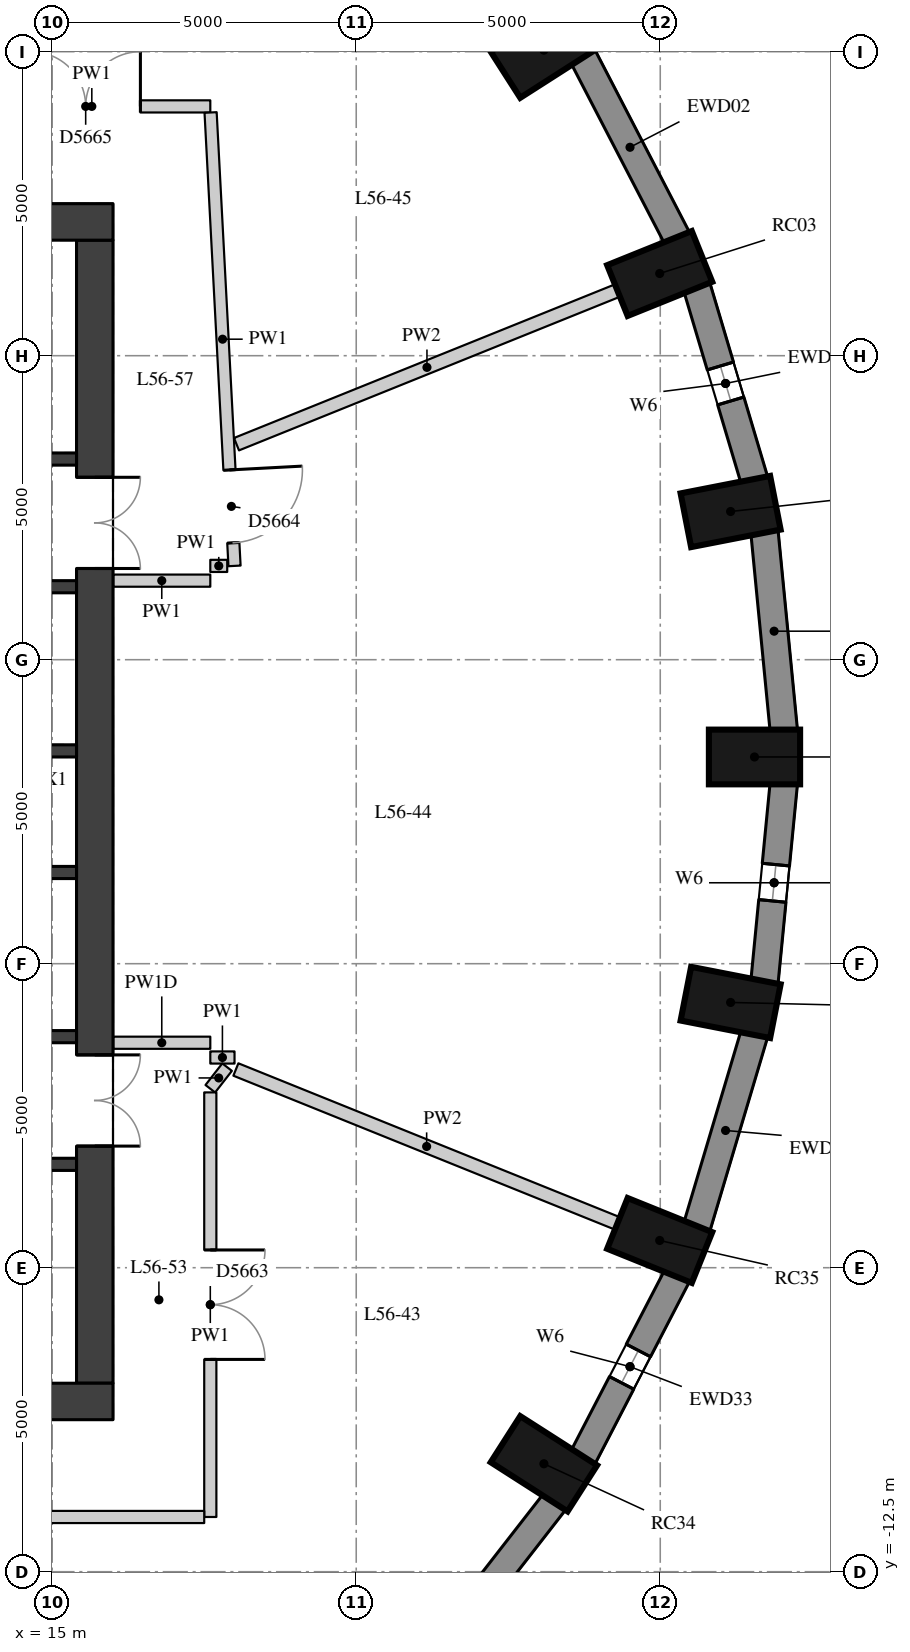
"""IFC4 building model, lengths in metres.
Left out: names, types, materials, properties, quantities, classifications, styles, units other than length and angle.
Written with IfcOpenShell. Run it as: python <this file> out.ifc"""

import sys

from ifc_helpers import new_model, si_unit, direction, frame, frame_2d, origin, origin_2d, place, context, subcontext, project, spatial, rectangle, extrude, element, fill, save


model = new_model("IFC4")
c1 = context("Model", 3, precision=1e-05, world=origin(), true_north=direction((0.0, 1.0)))
c2 = subcontext(c1, "Body", "Model", "MODEL_VIEW")
j1 = project(units=[si_unit("LENGTHUNIT", "METRE"), si_unit("PLANEANGLEUNIT", "RADIAN")], contexts=[c1])
p1 = place(None, origin())
s1 = spatial("IfcSite", under=j1, at=p1, CompositionType="ELEMENT")
p2 = place(p1, origin())
s2 = spatial("IfcBuilding", under=s1, at=p2, CompositionType="ELEMENT")
p3 = place(p2, frame((0.0, 0.0, 199.1)))
s3 = spatial("IfcBuildingStorey", under=s2, at=p3, CompositionType="ELEMENT", Elevation=199.1)
for number, where, z_axis, x_axis in (
    (1, (26.55, 0.9, 0.0), (0.0, 0.0, 1.0), (1.0, 0.0, 0.0)),
    (2, (26.157, 4.937, 0.0), (0.0, 0.0, 1.0), (0.981, 0.192, 0.0)),
    (3, (24.991, 8.852, 0.0), (0.0, 0.0, 1.0), (0.927, 0.374, 0.0)),
    (4, (23.087, 12.525, 0.0), (0.0, 0.0, 1.0), (0.842, 0.539, 0.0)),
    (5, (23.087, -10.725, 0.0), (0.0, 0.0, 1.0), (0.842, -0.539, 0.0)),
    (6, (24.991, -7.052, 0.0), (0.0, 0.0, 1.0), (0.927, -0.374, 0.0)),
    (7, (26.157, -3.137, 0.0), (0.0, 0.0, 1.0), (0.981, -0.192, 0.0)),
):
    element("IfcColumn", number, at=place(p3, frame(where, z_axis=z_axis, x_axis=x_axis)), inside=s3, PredefinedType="COLUMN", context=c2, shape_type="SweptSolid", body=[
        extrude(rectangle(XDim=1.5, YDim=0.9, at=origin_2d()), origin(), (0.0, 0.0, 1.0), 3.3),
    ])
p4 = place(p3, frame((27.032, 1.33, 0.0), z_axis=(0.0, 0.0, 1.0), x_axis=(-0.096824116835, 0.995301507283, 0.0)))
e8 = element("IfcWall", 8, at=p4, inside=s3, PredefinedType="SOLIDWALL", context=c2, shape_type="SweptSolid", body=[
    extrude(rectangle(XDim=3.293, YDim=0.45, at=frame_2d((1.646, 0.0))), origin(), (0.0, 0.0, 1.0), 3.02),
])
p5 = place(p3, frame((26.548, 5.452, 0.0), z_axis=(0.0, 0.0, 1.0), x_axis=(-0.285444972963, 0.958395099847, 0.0)))
e9 = element("IfcWall", 9, at=p5, inside=s3, PredefinedType="SOLIDWALL", context=c2, shape_type="SweptSolid", body=[
    extrude(rectangle(XDim=3.32, YDim=0.45, at=frame_2d((1.66, 0.0))), origin(), (0.0, 0.0, 1.0), 3.02),
])
p6 = place(p5, frame((1.36, 0.0, 0.4)))
e10 = element("IfcOpeningElement", 10, at=p6, cuts=e9, PredefinedType="OPENING", context=c2, shape_type="SweptSolid", body=[
    extrude(rectangle(XDim=0.6, YDim=1.75, at=frame_2d((0.3, 0.875))), frame((0.0, 0.235, 0.0), z_axis=(0.0, -1.0, 0.0), x_axis=(1.0, 0.0, 0.0)), (0.0, 0.0, 1.0), 0.47),
])
p7 = place(p3, frame((25.278, 9.432, 0.0), z_axis=(0.0, 0.0, 1.0), x_axis=(-0.460175500475, 0.887827972505, 0.0)))
e11 = element("IfcWall", 11, at=p7, inside=s3, PredefinedType="SOLIDWALL", context=c2, shape_type="SweptSolid", body=[
    extrude(rectangle(XDim=3.371, YDim=0.45, at=frame_2d((1.685, 0.0))), origin(), (0.0, 0.0, 1.0), 3.02),
])
p8 = place(p3, frame((21.151, -14.061, 0.0), z_axis=(0.0, 0.0, 1.0), x_axis=(0.614255239631, 0.789107407509, 0.0)))
e12 = element("IfcWall", 12, at=p8, inside=s3, PredefinedType="SOLIDWALL", context=c2, shape_type="SweptSolid", body=[
    extrude(rectangle(XDim=3.438, YDim=0.45, at=frame_2d((1.719, 0.0))), origin(), (0.0, 0.0, 1.0), 3.02),
])
p9 = place(p3, frame((23.727, -10.624, 0.0), z_axis=(0.0, 0.0, 1.0), x_axis=(0.460175500475, 0.887827972505, 0.0)))
e13 = element("IfcWall", 13, at=p9, inside=s3, PredefinedType="SOLIDWALL", context=c2, shape_type="SweptSolid", body=[
    extrude(rectangle(XDim=3.371, YDim=0.45, at=frame_2d((1.685, 0.0))), origin(), (0.0, 0.0, 1.0), 3.02),
])
p10 = place(p9, frame((1.385, 0.0, 0.4)))
e14 = element("IfcOpeningElement", 14, at=p10, cuts=e13, PredefinedType="OPENING", context=c2, shape_type="SweptSolid", body=[
    extrude(rectangle(XDim=0.6, YDim=1.75, at=frame_2d((0.3, 0.875))), frame((0.0, 0.235, 0.0), z_axis=(0.0, -1.0, 0.0), x_axis=(1.0, 0.0, 0.0)), (0.0, 0.0, 1.0), 0.47),
])
p11 = place(p3, frame((25.6, -6.834, 0.0), z_axis=(0.0, 0.0, 1.0), x_axis=(0.285444972963, 0.958395099847, 0.0)))
e15 = element("IfcWall", 15, at=p11, inside=s3, PredefinedType="SOLIDWALL", context=c2, shape_type="SweptSolid", body=[
    extrude(rectangle(XDim=3.32, YDim=0.45, at=frame_2d((1.66, 0.0))), origin(), (0.0, 0.0, 1.0), 3.02),
])
p12 = place(p3, frame((26.713, -2.808, 0.0), z_axis=(0.0, 0.0, 1.0), x_axis=(0.096816972749, 0.995302202242, 0.0)))
e16 = element("IfcWall", 16, at=p12, inside=s3, PredefinedType="SOLIDWALL", context=c2, shape_type="SweptSolid", body=[
    extrude(rectangle(XDim=3.293, YDim=0.45, at=frame_2d((1.646, 0.0))), origin(), (0.0, 0.0, 1.0), 3.02),
])
p13 = place(p12, frame((1.347, 0.0, 0.4)))
e17 = element("IfcOpeningElement", 17, at=p13, cuts=e16, PredefinedType="OPENING", context=c2, shape_type="SweptSolid", body=[
    extrude(rectangle(XDim=0.6, YDim=1.75, at=frame_2d((0.3, 0.875))), frame((0.0, 0.235, 0.0), z_axis=(0.0, -1.0, 0.0), x_axis=(1.0, 0.0, 0.0)), (0.0, 0.0, 1.0), 0.47),
])
p14 = place(p3, frame((15.7, -9.4, 0.0), z_axis=(0.0, 0.0, 1.0), x_axis=(0.0, 1.0, 0.0)))
e18 = element("IfcWall", 18, at=p14, inside=s3, PredefinedType="SHEAR", context=c2, shape_type="SweptSolid", body=[
    extrude(rectangle(XDim=18.8, YDim=0.6, at=frame_2d((9.4, 0.0))), origin(), (0.0, 0.0, 1.0), 3.02),
])
p15 = place(p14, frame((13.4, 0.0, 0.0)))
e19 = element("IfcOpeningElement", 19, at=p15, cuts=e18, PredefinedType="OPENING", context=c2, shape_type="SweptSolid", body=[
    extrude(rectangle(XDim=1.5, YDim=2.1, at=frame_2d((0.75, 1.05))), frame((0.0, 0.31, 0.0), z_axis=(0.0, -1.0, 0.0), x_axis=(1.0, 0.0, 0.0)), (0.0, 0.0, 1.0), 0.62),
])
p16 = place(p14, frame((3.9, 0.0, 0.0)))
e20 = element("IfcOpeningElement", 20, at=p16, cuts=e18, PredefinedType="OPENING", context=c2, shape_type="SweptSolid", body=[
    extrude(rectangle(XDim=1.5, YDim=2.1, at=frame_2d((0.75, 1.05))), frame((0.0, 0.31, 0.0), z_axis=(0.0, -1.0, 0.0), x_axis=(1.0, 0.0, 0.0)), (0.0, 0.0, 1.0), 0.62),
])
for number, where, z_axis, x_axis in (
    (21, (4.0, 9.7, 0.0), (0.0, 0.0, 1.0), (1.0, 0.0, 0.0)),
    (22, (4.0, -9.7, 0.0), (0.0, 0.0, 1.0), (1.0, 0.0, 0.0)),
):
    element("IfcWall", number, at=place(p3, frame(where, z_axis=z_axis, x_axis=x_axis)), inside=s3, PredefinedType="SHEAR", context=c2, shape_type="SweptSolid", body=[
        extrude(rectangle(XDim=12.0, YDim=0.6, at=frame_2d((6.0, 0.0))), origin(), (0.0, 0.0, 1.0), 3.02),
    ])
p17 = place(p3, frame((4.6, 5.8, 0.0), z_axis=(0.0, 0.0, 1.0), x_axis=(1.0, 0.0, 0.0)))
e23 = element("IfcWall", 23, at=p17, inside=s3, PredefinedType="SHEAR", context=c2, shape_type="SweptSolid", body=[
    extrude(rectangle(XDim=10.8, YDim=0.2, at=frame_2d((5.4, 0.0))), origin(), (0.0, 0.0, 1.0), 3.02),
])
p18 = place(p17, frame((7.05, 0.0, 0.0)))
e24 = element("IfcOpeningElement", 24, at=p18, cuts=e23, PredefinedType="OPENING", context=c2, shape_type="SweptSolid", body=[
    extrude(rectangle(XDim=1.1, YDim=2.1, at=frame_2d((0.55, 1.05))), frame((0.0, 0.11, 0.0), z_axis=(0.0, -1.0, 0.0), x_axis=(1.0, 0.0, 0.0)), (0.0, 0.0, 1.0), 0.22),
])
p19 = place(p17, frame((9.05, 0.0, 0.0)))
e25 = element("IfcOpeningElement", 25, at=p19, cuts=e23, PredefinedType="OPENING", context=c2, shape_type="SweptSolid", body=[
    extrude(rectangle(XDim=1.1, YDim=2.1, at=frame_2d((0.55, 1.05))), frame((0.0, 0.11, 0.0), z_axis=(0.0, -1.0, 0.0), x_axis=(1.0, 0.0, 0.0)), (0.0, 0.0, 1.0), 0.22),
])
p20 = place(p3, frame((4.6, 3.7, 0.0), z_axis=(0.0, 0.0, 1.0), x_axis=(1.0, 0.0, 0.0)))
e26 = element("IfcWall", 26, at=p20, inside=s3, PredefinedType="SHEAR", context=c2, shape_type="SweptSolid", body=[
    extrude(rectangle(XDim=10.8, YDim=0.2, at=frame_2d((5.4, 0.0))), origin(), (0.0, 0.0, 1.0), 3.02),
])
p21 = place(p20, frame((6.6, 0.0, 0.0)))
e27 = element("IfcOpeningElement", 27, at=p21, cuts=e26, PredefinedType="OPENING", context=c2, shape_type="SweptSolid", body=[
    extrude(rectangle(XDim=1.1, YDim=2.1, at=frame_2d((0.55, 1.05))), frame((0.0, 0.11, 0.0), z_axis=(0.0, -1.0, 0.0), x_axis=(1.0, 0.0, 0.0)), (0.0, 0.0, 1.0), 0.22),
])
p22 = place(p20, frame((8.9, 0.0, 0.0)))
e28 = element("IfcOpeningElement", 28, at=p22, cuts=e26, PredefinedType="OPENING", context=c2, shape_type="SweptSolid", body=[
    extrude(rectangle(XDim=1.1, YDim=2.1, at=frame_2d((0.55, 1.05))), frame((0.0, 0.11, 0.0), z_axis=(0.0, -1.0, 0.0), x_axis=(1.0, 0.0, 0.0)), (0.0, 0.0, 1.0), 0.22),
])
for number, where, z_axis, x_axis in (
    (29, (4.6, 1.0, 0.0), (0.0, 0.0, 1.0), (1.0, 0.0, 0.0)),
    (30, (4.6, -1.0, 0.0), (0.0, 0.0, 1.0), (1.0, 0.0, 0.0)),
):
    element("IfcWall", number, at=place(p3, frame(where, z_axis=z_axis, x_axis=x_axis)), inside=s3, PredefinedType="SHEAR", context=c2, shape_type="SweptSolid", body=[
        extrude(rectangle(XDim=10.8, YDim=0.2, at=frame_2d((5.4, 0.0))), origin(), (0.0, 0.0, 1.0), 3.02),
    ])
p23 = place(p3, frame((4.6, -3.7, 0.0), z_axis=(0.0, 0.0, 1.0), x_axis=(1.0, 0.0, 0.0)))
e31 = element("IfcWall", 31, at=p23, inside=s3, PredefinedType="SHEAR", context=c2, shape_type="SweptSolid", body=[
    extrude(rectangle(XDim=10.8, YDim=0.2, at=frame_2d((5.4, 0.0))), origin(), (0.0, 0.0, 1.0), 3.02),
])
p24 = place(p23, frame((6.6, 0.0, 0.0)))
e32 = element("IfcOpeningElement", 32, at=p24, cuts=e31, PredefinedType="OPENING", context=c2, shape_type="SweptSolid", body=[
    extrude(rectangle(XDim=1.1, YDim=2.1, at=frame_2d((0.55, 1.05))), frame((0.0, 0.11, 0.0), z_axis=(0.0, -1.0, 0.0), x_axis=(1.0, 0.0, 0.0)), (0.0, 0.0, 1.0), 0.22),
])
p25 = place(p23, frame((8.9, 0.0, 0.0)))
e33 = element("IfcOpeningElement", 33, at=p25, cuts=e31, PredefinedType="OPENING", context=c2, shape_type="SweptSolid", body=[
    extrude(rectangle(XDim=1.1, YDim=2.1, at=frame_2d((0.55, 1.05))), frame((0.0, 0.11, 0.0), z_axis=(0.0, -1.0, 0.0), x_axis=(1.0, 0.0, 0.0)), (0.0, 0.0, 1.0), 0.22),
])
p26 = place(p3, frame((4.6, -5.8, 0.0), z_axis=(0.0, 0.0, 1.0), x_axis=(1.0, 0.0, 0.0)))
e34 = element("IfcWall", 34, at=p26, inside=s3, PredefinedType="SHEAR", context=c2, shape_type="SweptSolid", body=[
    extrude(rectangle(XDim=10.8, YDim=0.2, at=frame_2d((5.4, 0.0))), origin(), (0.0, 0.0, 1.0), 3.02),
])
p27 = place(p3, frame((17.6, -4.043, 0.0), z_axis=(0.0, 0.0, 1.0), x_axis=(1.0, 0.0, 0.0)))
e35 = element("IfcWall", 35, at=p27, inside=s3, PredefinedType="PARTITIONING", context=c2, shape_type="SweptSolid", body=[
    extrude(rectangle(XDim=0.398, YDim=0.2, at=frame_2d((0.199, 0.0))), origin(), (0.0, 0.0, 1.0), 3.02),
])
p28 = place(p3, frame((17.876, -4.201, 0.0), z_axis=(0.0, 0.0, 1.0), x_axis=(-0.61405326993, -0.789264582816, 0.0)))
e36 = element("IfcWall", 36, at=p28, inside=s3, PredefinedType="PARTITIONING", context=c2, shape_type="SweptSolid", body=[
    extrude(rectangle(XDim=0.45, YDim=0.2, at=frame_2d((0.225, 0.0))), origin(), (0.0, 0.0, 1.0), 3.02),
])
p29 = place(p3, frame((17.6, -4.617, 0.0), z_axis=(0.0, 0.0, 1.0), x_axis=(0.0, -1.0, 0.0)))
e37 = element("IfcWall", 37, at=p29, inside=s3, PredefinedType="PARTITIONING", context=c2, shape_type="SweptSolid", body=[
    extrude(rectangle(XDim=6.983, YDim=0.2, at=frame_2d((3.492, 0.0))), origin(), (0.0, 0.0, 1.0), 3.02),
])
p30 = place(p29, frame((2.592, 0.0, 0.0)))
e38 = element("IfcOpeningElement", 38, at=p30, cuts=e37, PredefinedType="OPENING", context=c2, shape_type="SweptSolid", body=[
    extrude(rectangle(XDim=1.8, YDim=2.1, at=frame_2d((0.9, 1.05))), frame((0.0, 0.11, 0.0), z_axis=(0.0, -1.0, 0.0), x_axis=(1.0, 0.0, 0.0)), (0.0, 0.0, 1.0), 0.22),
])
p31 = place(p3, frame((17.5, -11.6, 0.0), z_axis=(0.0, 0.0, 1.0), x_axis=(-1.0, 0.0, 0.0)))
e39 = element("IfcWall", 39, at=p31, inside=s3, PredefinedType="PARTITIONING", context=c2, shape_type="SweptSolid", body=[
    extrude(rectangle(XDim=7.847, YDim=0.2, at=frame_2d((3.923, 0.0))), origin(), (0.0, 0.0, 1.0), 3.02),
])
p32 = place(p3, frame((13.703, 11.6, 0.0), z_axis=(0.0, 0.0, 1.0), x_axis=(1.0, 0.0, 0.0)))
e40 = element("IfcWall", 40, at=p32, inside=s3, PredefinedType="PARTITIONING", context=c2, shape_type="SweptSolid", body=[
    extrude(rectangle(XDim=3.897, YDim=0.2, at=frame_2d((1.949, 0.0))), origin(), (0.0, 0.0, 1.0), 3.02),
])
p33 = place(p32, frame((0.948, 0.0, 0.0)))
e41 = element("IfcOpeningElement", 41, at=p33, cuts=e40, PredefinedType="OPENING", context=c2, shape_type="SweptSolid", body=[
    extrude(rectangle(XDim=1.8, YDim=2.1, at=frame_2d((0.9, 1.05))), frame((0.0, 0.11, 0.0), z_axis=(0.0, -1.0, 0.0), x_axis=(1.0, 0.0, 0.0)), (0.0, 0.0, 1.0), 0.22),
])
p34 = place(p3, frame((17.605, 11.5, 0.0), z_axis=(0.0, 0.0, 1.0), x_axis=(0.052701255232, -0.998610323248, 0.0)))
e42 = element("IfcWall", 42, at=p34, inside=s3, PredefinedType="PARTITIONING", context=c2, shape_type="SweptSolid", body=[
    extrude(rectangle(XDim=7.468, YDim=0.2, at=frame_2d((3.734, 0.0))), origin(), (0.0, 0.0, 1.0), 3.02),
])
p35 = place(p34, frame((5.887, 0.0, 0.0)))
e43 = element("IfcOpeningElement", 43, at=p35, cuts=e42, PredefinedType="OPENING", context=c2, shape_type="SweptSolid", body=[
    extrude(rectangle(XDim=1.2, YDim=2.1, at=frame_2d((0.6, 1.05))), frame((0.0, 0.11, 0.0), z_axis=(0.0, -1.0, 0.0), x_axis=(1.0, 0.0, 0.0)), (0.0, 0.0, 1.0), 0.22),
])
p36 = place(p3, frame((17.878, 4.043, 0.0), z_axis=(0.0, 0.0, 1.0), x_axis=(-1.0, 0.0, 0.0)))
e44 = element("IfcWall", 44, at=p36, inside=s3, PredefinedType="PARTITIONING", context=c2, shape_type="SweptSolid", body=[
    extrude(rectangle(XDim=0.278, YDim=0.2, at=frame_2d((0.139, 0.0))), origin(), (0.0, 0.0, 1.0), 3.02),
])
p37 = place(p3, frame((17.6, 3.8, 0.0), z_axis=(0.0, 0.0, 1.0), x_axis=(-1.0, 0.0, 0.0)))
e45 = element("IfcWall", 45, at=p37, inside=s3, PredefinedType="PARTITIONING", context=c2, shape_type="SweptSolid", body=[
    extrude(rectangle(XDim=1.596, YDim=0.2, at=frame_2d((0.798, 0.0))), origin(), (0.0, 0.0, 1.0), 3.02),
])
p38 = place(p3, frame((16.004, -3.8, 0.0), z_axis=(0.0, 0.0, 1.0), x_axis=(1.0, 0.0, 0.0)))
e46 = element("IfcWall", 46, at=p38, inside=s3, PredefinedType="PARTITIONING", context=c2, shape_type="SweptSolid", body=[
    extrude(rectangle(XDim=1.596, YDim=0.2, at=frame_2d((0.798, 0.0))), origin(), (0.0, 0.0, 1.0), 2.47),
])
p39 = place(p3, frame((24.295, 8.571, 0.0), z_axis=(0.0, 0.0, 1.0), x_axis=(-0.927395972896, -0.374081153571, 0.0)))
e47 = element("IfcWall", 47, at=p39, inside=s3, PredefinedType="PARTITIONING", context=c2, shape_type="SweptSolid", body=[
    extrude(rectangle(XDim=6.755, YDim=0.22, at=frame_2d((3.377, 0.0))), origin(), (0.0, 0.0, 1.0), 3.02),
])
p40 = place(p3, frame((16.863, -16.312, 0.0), z_axis=(0.0, 0.0, 1.0), x_axis=(-0.603636051313, 0.797260006243, 0.0)))
e48 = element("IfcWall", 48, at=p40, inside=s3, PredefinedType="PARTITIONING", context=c2, shape_type="SweptSolid", body=[
    extrude(rectangle(XDim=5.706, YDim=0.22, at=frame_2d((2.853, 0.0))), origin(), (0.0, 0.0, 1.0), 3.02),
])
p41 = place(p3, frame((24.295, -6.771, 0.0), z_axis=(0.0, 0.0, 1.0), x_axis=(-0.927382720906, 0.374114005305, 0.0)))
e49 = element("IfcWall", 49, at=p41, inside=s3, PredefinedType="PARTITIONING", context=c2, shape_type="SweptSolid", body=[
    extrude(rectangle(XDim=6.766, YDim=0.22, at=frame_2d((3.383, 0.0))), origin(), (0.0, 0.0, 1.0), 3.02),
])
p42 = place(p6, origin())
e50 = element("IfcWindow", 50, at=p42, inside=s3, PartitioningType="SINGLE_PANEL", PredefinedType="WINDOW", context=c2, shape_type="SweptSolid", body=[
    extrude(rectangle(XDim=0.6, YDim=1.75, at=frame_2d((0.3, 0.875))), frame((0.0, 0.035, 0.0), z_axis=(0.0, -1.0, 0.0), x_axis=(1.0, 0.0, 0.0)), (0.0, 0.0, 1.0), 0.06),
])
fill(e10, e50)
p43 = place(p10, origin())
e51 = element("IfcWindow", 51, at=p43, inside=s3, PartitioningType="SINGLE_PANEL", PredefinedType="WINDOW", context=c2, shape_type="SweptSolid", body=[
    extrude(rectangle(XDim=0.6, YDim=1.75, at=frame_2d((0.3, 0.875))), frame((0.0, 0.035, 0.0), z_axis=(0.0, -1.0, 0.0), x_axis=(1.0, 0.0, 0.0)), (0.0, 0.0, 1.0), 0.06),
])
fill(e14, e51)
p44 = place(p13, origin())
e52 = element("IfcWindow", 52, at=p44, inside=s3, PartitioningType="SINGLE_PANEL", PredefinedType="WINDOW", context=c2, shape_type="SweptSolid", body=[
    extrude(rectangle(XDim=0.6, YDim=1.75, at=frame_2d((0.3, 0.875))), frame((0.0, 0.035, 0.0), z_axis=(0.0, -1.0, 0.0), x_axis=(1.0, 0.0, 0.0)), (0.0, 0.0, 1.0), 0.06),
])
fill(e17, e52)
p45 = place(p15, origin())
e53 = element("IfcDoor", 53, at=p45, inside=s3, OperationType="DOUBLE_DOOR_SINGLE_SWING", PredefinedType="DOOR", context=c2, shape_type="SweptSolid", body=[
    extrude(rectangle(XDim=1.5, YDim=2.1, at=frame_2d((0.75, 1.05))), frame((0.0, 0.025, 0.0), z_axis=(0.0, -1.0, 0.0), x_axis=(1.0, 0.0, 0.0)), (0.0, 0.0, 1.0), 0.05),
])
fill(e19, e53)
p46 = place(p16, origin())
e54 = element("IfcDoor", 54, at=p46, inside=s3, OperationType="DOUBLE_DOOR_SINGLE_SWING", PredefinedType="DOOR", context=c2, shape_type="SweptSolid", body=[
    extrude(rectangle(XDim=1.5, YDim=2.1, at=frame_2d((0.75, 1.05))), frame((0.0, 0.025, 0.0), z_axis=(0.0, -1.0, 0.0), x_axis=(1.0, 0.0, 0.0)), (0.0, 0.0, 1.0), 0.05),
])
fill(e20, e54)
p47 = place(p30, origin())
e55 = element("IfcDoor", 55, at=p47, inside=s3, OperationType="DOUBLE_DOOR_SINGLE_SWING", PredefinedType="DOOR", context=c2, shape_type="SweptSolid", body=[
    extrude(rectangle(XDim=1.8, YDim=2.1, at=frame_2d((0.9, 1.05))), frame((0.0, 0.025, 0.0), z_axis=(0.0, -1.0, 0.0), x_axis=(1.0, 0.0, 0.0)), (0.0, 0.0, 1.0), 0.05),
])
fill(e38, e55)
p48 = place(p35, origin())
e56 = element("IfcDoor", 56, at=p48, inside=s3, OperationType="SINGLE_SWING_LEFT", PredefinedType="DOOR", context=c2, shape_type="SweptSolid", body=[
    extrude(rectangle(XDim=1.2, YDim=2.1, at=frame_2d((0.6, 1.05))), frame((0.0, 0.025, 0.0), z_axis=(0.0, -1.0, 0.0), x_axis=(1.0, 0.0, 0.0)), (0.0, 0.0, 1.0), 0.05),
])
fill(e43, e56)
p49 = place(p33, origin())
e57 = element("IfcDoor", 57, at=p49, inside=s3, OperationType="DOUBLE_DOOR_SINGLE_SWING", PredefinedType="DOOR", context=c2, shape_type="SweptSolid", body=[
    extrude(rectangle(XDim=1.8, YDim=2.1, at=frame_2d((0.9, 1.05))), frame((0.0, 0.025, 0.0), z_axis=(0.0, -1.0, 0.0), x_axis=(1.0, 0.0, 0.0)), (0.0, 0.0, 1.0), 0.05),
])
fill(e41, e57)
save(model, sys.argv[1])
